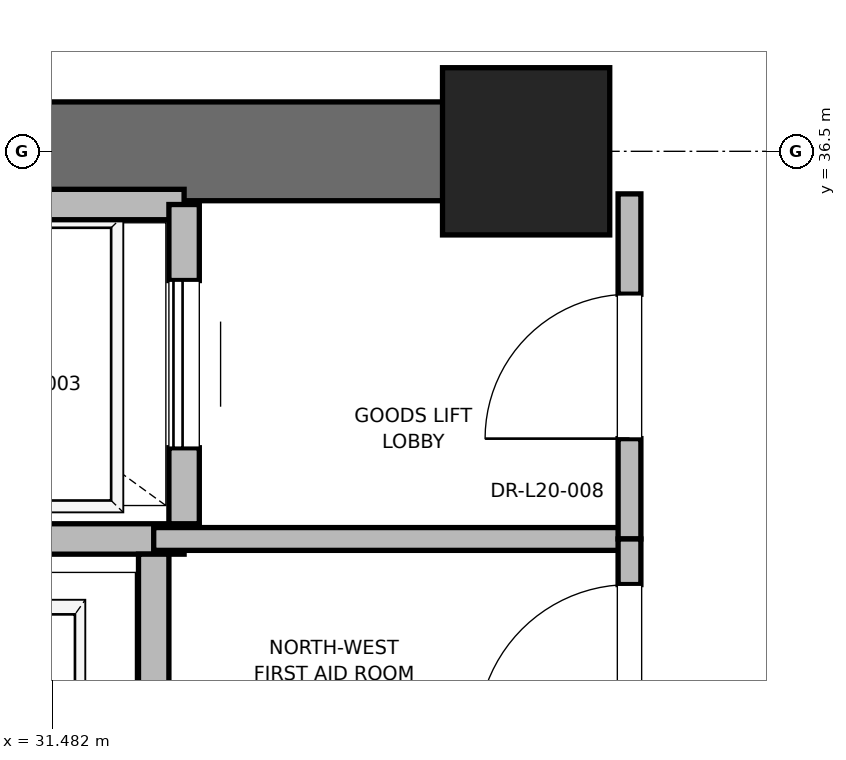
"""IFC4 building model, lengths in metres.
Left out: names, types, materials, properties, quantities, classifications, styles, units other than length and angle.
Written with IfcOpenShell. Run it as: python <this file> out.ifc"""

import sys

from ifc_helpers import new_model, si_unit, direction, frame, frame_2d, origin, origin_2d, place, context, subcontext, project, spatial, rectangle, extrude, element, fill, save


model = new_model("IFC4")
c1 = context("Model", 3, precision=1e-05, world=origin(), true_north=direction((0.0, 1.0)))
c2 = subcontext(c1, "Body", "Model", "MODEL_VIEW")
j1 = project(units=[si_unit("LENGTHUNIT", "METRE"), si_unit("PLANEANGLEUNIT", "RADIAN")], contexts=[c1])
p1 = place(None, origin())
s1 = spatial("IfcSite", under=j1, at=p1, CompositionType="ELEMENT")
p2 = place(p1, origin())
s2 = spatial("IfcBuilding", under=s1, at=p2, CompositionType="ELEMENT")
p3 = place(p2, frame((0.0, 0.0, 87.6)))
s3 = spatial("IfcBuildingStorey", under=s2, at=p3, CompositionType="ELEMENT", Elevation=87.6)
p4 = place(p3, frame((34.6, 36.5, 0.0), z_axis=(0.0, 0.0, 1.0), x_axis=(1.0, 0.0, 0.0)))
e1 = element("IfcColumn", 1, at=p4, inside=s3, PredefinedType="PILASTER", context=c2, shape_type="SweptSolid", body=[
    extrude(rectangle(XDim=1.1, YDim=1.1, at=origin_2d()), origin(), (0.0, 0.0, 1.0), 4.0),
])
p5 = place(p3, frame((29.0, 36.5, 0.0), z_axis=(0.0, 0.0, 1.0), x_axis=(1.0, 0.0, 0.0)))
e2 = element("IfcWall", 2, at=p5, inside=s3, PredefinedType="SHEAR", context=c2, shape_type="SweptSolid", body=[
    extrude(rectangle(XDim=5.8, YDim=0.65, at=frame_2d((2.9, 0.0))), origin(), (0.0, 0.0, 1.0), 3.76),
])
p6 = place(p3, frame((29.55, 33.95, 0.0), z_axis=(0.0, 0.0, 1.0), x_axis=(1.0, 0.0, 0.0)))
e3 = element("IfcWall", 3, at=p6, inside=s3, PredefinedType="SOLIDWALL", context=c2, shape_type="SweptSolid", body=[
    extrude(rectangle(XDim=2.8, YDim=0.2, at=frame_2d((1.4, 0.0))), origin(), (0.0, 0.0, 1.0), 3.76),
])
p7 = place(p3, frame((32.15, 30.85, 0.0), z_axis=(0.0, 0.0, 1.0), x_axis=(0.0, 1.0, 0.0)))
e4 = element("IfcWall", 4, at=p7, inside=s3, PredefinedType="SOLIDWALL", context=c2, shape_type="SweptSolid", body=[
    extrude(rectangle(XDim=3.0, YDim=0.2, at=frame_2d((1.5, 0.0))), origin(), (0.0, 0.0, 1.0), 3.76),
])
p8 = place(p3, frame((32.35, 36.15, 0.0), z_axis=(0.0, 0.0, 1.0), x_axis=(-1.0, 0.0, 0.0)))
e5 = element("IfcWall", 5, at=p8, inside=s3, PredefinedType="SOLIDWALL", context=c2, shape_type="SweptSolid", body=[
    extrude(rectangle(XDim=2.8, YDim=0.2, at=frame_2d((1.4, 0.0))), origin(), (0.0, 0.0, 1.0), 2.889),
])
p9 = place(p3, frame((32.35, 34.05, 0.0), z_axis=(0.0, 0.0, 1.0), x_axis=(0.0, 1.0, 0.0)))
e6 = element("IfcWall", 6, at=p9, inside=s3, PredefinedType="SOLIDWALL", context=c2, shape_type="SweptSolid", body=[
    extrude(rectangle(XDim=2.1, YDim=0.2, at=frame_2d((1.05, 0.0))), origin(), (0.0, 0.0, 1.0), 3.76),
])
p10 = place(p9, frame((0.5, 0.0, 0.0)))
e7 = element("IfcOpeningElement", 7, at=p10, cuts=e6, PredefinedType="OPENING", context=c2, shape_type="SweptSolid", body=[
    extrude(rectangle(XDim=1.1, YDim=2.2, at=frame_2d((0.55, 1.1))), frame((0.0, 0.1, 0.0), z_axis=(0.0, -1.0, 0.0), x_axis=(1.0, 0.0, 0.0)), (0.0, 0.0, 1.0), 0.2),
])
p11 = place(p3, frame((32.15, 33.95, 0.0), z_axis=(0.0, 0.0, 1.0), x_axis=(1.0, 0.0, 0.0)))
e8 = element("IfcWall", 8, at=p11, inside=s3, PredefinedType="PARTITIONING", context=c2, shape_type="SweptSolid", body=[
    extrude(rectangle(XDim=3.13, YDim=0.15, at=frame_2d((1.565, 0.0))), origin(), (0.0, 0.0, 1.0), 2.85),
])
p12 = place(p3, frame((35.28, 33.95, 0.0), z_axis=(0.0, 0.0, 1.0), x_axis=(0.0, 1.0, 0.0)))
e9 = element("IfcWall", 9, at=p12, inside=s3, PredefinedType="PARTITIONING", context=c2, shape_type="SweptSolid", body=[
    extrude(rectangle(XDim=2.27, YDim=0.15, at=frame_2d((1.135, 0.0))), origin(), (0.0, 0.0, 1.0), 2.54),
])
p13 = place(p12, frame((0.66, 0.0, 0.0)))
e10 = element("IfcOpeningElement", 10, at=p13, cuts=e9, PredefinedType="OPENING", context=c2, shape_type="SweptSolid", body=[
    extrude(rectangle(XDim=0.95, YDim=2.15, at=frame_2d((0.475, 1.075))), frame((0.0, 0.075, 0.0), z_axis=(0.0, -1.0, 0.0), x_axis=(1.0, 0.0, 0.0)), (0.0, 0.0, 1.0), 0.15),
])
p14 = place(p3, frame((35.28, 32.35, 0.0), z_axis=(0.0, 0.0, 1.0), x_axis=(0.0, 1.0, 0.0)))
e11 = element("IfcWall", 11, at=p14, inside=s3, PredefinedType="PARTITIONING", context=c2, shape_type="SweptSolid", body=[
    extrude(rectangle(XDim=1.6, YDim=0.15, at=frame_2d((0.8, 0.0))), origin(), (0.0, 0.0, 1.0), 2.85),
])
p15 = place(p14, frame((0.3, 0.0, 0.0)))
e12 = element("IfcOpeningElement", 12, at=p15, cuts=e11, PredefinedType="OPENING", context=c2, shape_type="SweptSolid", body=[
    extrude(rectangle(XDim=1.0, YDim=2.15, at=frame_2d((0.5, 1.075))), frame((0.0, 0.075, 0.0), z_axis=(0.0, -1.0, 0.0), x_axis=(1.0, 0.0, 0.0)), (0.0, 0.0, 1.0), 0.15),
])
p16 = place(p10, origin())
e13 = element("IfcDoor", 13, at=p16, inside=s3, OperationType="SLIDING_TO_RIGHT", PredefinedType="DOOR", context=c2, shape_type="SweptSolid", body=[
    extrude(rectangle(XDim=1.1, YDim=2.2, at=frame_2d((0.55, 1.1))), frame((0.0, 0.025, 0.0), z_axis=(0.0, -1.0, 0.0), x_axis=(1.0, 0.0, 0.0)), (0.0, 0.0, 1.0), 0.05),
])
fill(e7, e13)
p17 = place(p13, origin())
e14 = element("IfcDoor", 14, at=p17, inside=s3, OperationType="SINGLE_SWING_LEFT", PredefinedType="DOOR", context=c2, shape_type="SweptSolid", body=[
    extrude(rectangle(XDim=0.95, YDim=2.15, at=frame_2d((0.475, 1.075))), frame((0.0, 0.025, 0.0), z_axis=(0.0, -1.0, 0.0), x_axis=(1.0, 0.0, 0.0)), (0.0, 0.0, 1.0), 0.05),
])
fill(e10, e14)
p18 = place(p15, origin())
e15 = element("IfcDoor", 15, at=p18, inside=s3, OperationType="SINGLE_SWING_LEFT", PredefinedType="DOOR", context=c2, shape_type="SweptSolid", body=[
    extrude(rectangle(XDim=1.0, YDim=2.15, at=frame_2d((0.5, 1.075))), frame((0.0, 0.025, 0.0), z_axis=(0.0, -1.0, 0.0), x_axis=(1.0, 0.0, 0.0)), (0.0, 0.0, 1.0), 0.05),
])
fill(e12, e15)
save(model, sys.argv[1])
